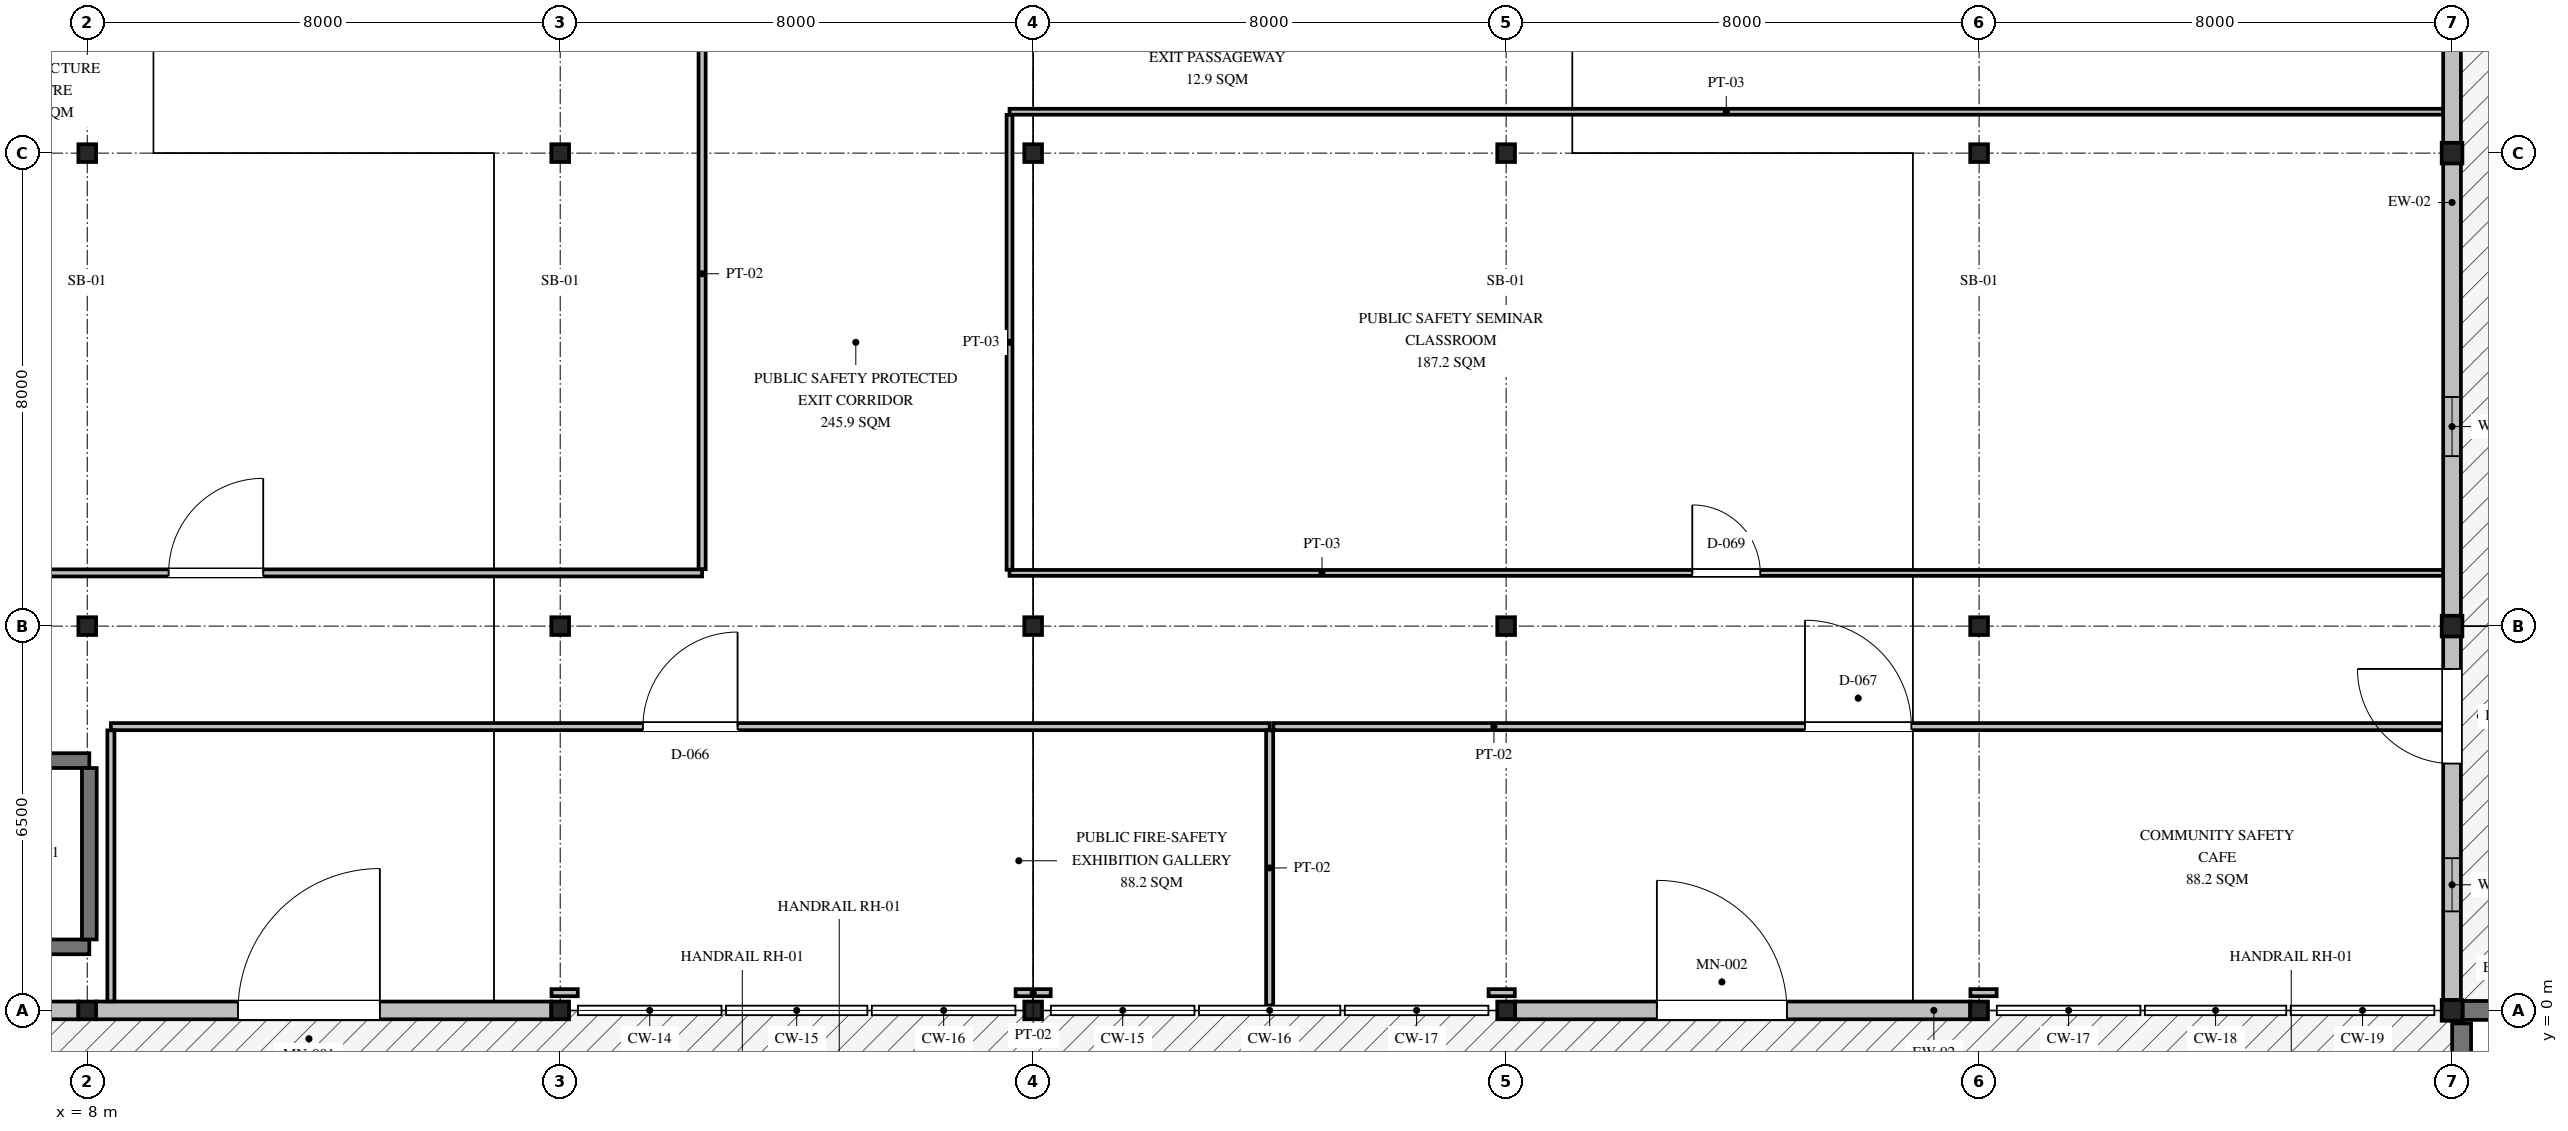
"""IFC4 building model, lengths in metres.
Left out: names, types, materials, properties, quantities, classifications, styles, units other than length and angle.
Written with IfcOpenShell. Run it as: python <this file> out.ifc"""

import sys

from ifc_helpers import new_model, si_unit, direction, frame, frame_2d, origin, origin_2d, place, context, subcontext, project, spatial, rectangle, i_section, extrude, element, fill, save


model = new_model("IFC4")
c1 = context("Model", 3, precision=1e-05, world=origin(), true_north=direction((0.0, 1.0)))
c2 = subcontext(c1, "Body", "Model", "MODEL_VIEW")
j1 = project(units=[si_unit("LENGTHUNIT", "METRE"), si_unit("PLANEANGLEUNIT", "RADIAN")], contexts=[c1])
p1 = place(None, origin())
s1 = spatial("IfcSite", under=j1, at=p1, CompositionType="ELEMENT")
p2 = place(p1, origin())
s2 = spatial("IfcBuilding", under=s1, at=p2, CompositionType="ELEMENT")
p3 = place(p2, frame((0.0, 0.0, 0.45)))
s3 = spatial("IfcBuildingStorey", under=s2, at=p3, CompositionType="ELEMENT", Elevation=0.45)
for number, where, z_axis, x_axis in (
    (1, (8.0, 0.0, -0.45), (0.0, 0.0, 1.0), (1.0, 0.0, 0.0)),
    (2, (8.0, 6.5, -0.45), (0.0, 0.0, 1.0), (1.0, 0.0, 0.0)),
    (3, (8.0, 14.5, -0.45), (0.0, 0.0, 1.0), (1.0, 0.0, 0.0)),
    (4, (16.0, 0.0, -0.45), (0.0, 0.0, 1.0), (1.0, 0.0, 0.0)),
    (5, (16.0, 6.5, -0.45), (0.0, 0.0, 1.0), (1.0, 0.0, 0.0)),
    (6, (16.0, 14.5, -0.45), (0.0, 0.0, 1.0), (1.0, 0.0, 0.0)),
    (7, (24.0, 0.0, -0.45), (0.0, 0.0, 1.0), (1.0, 0.0, 0.0)),
    (8, (24.0, 6.5, -0.45), (0.0, 0.0, 1.0), (1.0, 0.0, 0.0)),
    (9, (24.0, 14.5, -0.45), (0.0, 0.0, 1.0), (1.0, 0.0, 0.0)),
    (10, (32.0, 0.0, -0.45), (0.0, 0.0, 1.0), (1.0, 0.0, 0.0)),
    (11, (32.0, 6.5, -0.45), (0.0, 0.0, 1.0), (1.0, 0.0, 0.0)),
    (12, (32.0, 14.5, -0.45), (0.0, 0.0, 1.0), (1.0, 0.0, 0.0)),
    (13, (40.0, 0.0, -0.45), (0.0, 0.0, 1.0), (1.0, 0.0, 0.0)),
    (14, (40.0, 6.5, -0.45), (0.0, 0.0, 1.0), (1.0, 0.0, 0.0)),
    (15, (40.0, 14.5, -0.45), (0.0, 0.0, 1.0), (1.0, 0.0, 0.0)),
):
    element("IfcColumn", number, at=place(p3, frame(where, z_axis=z_axis, x_axis=x_axis)), inside=s3, PredefinedType="COLUMN", context=c2, shape_type="SweptSolid", body=[
        extrude(i_section(OverallWidth=0.3, OverallDepth=0.3, WebThickness=0.01, FlangeThickness=0.015, FilletRadius=0.018, at=origin_2d()), origin(), (0.0, 0.0, 1.0), 5.85),
    ])
for number, where, z_axis, x_axis in (
    (16, (48.0, 0.0, -0.45), (0.0, 0.0, 1.0), (1.0, 0.0, 0.0)),
    (17, (48.0, 6.5, -0.45), (0.0, 0.0, 1.0), (1.0, 0.0, 0.0)),
    (18, (48.0, 14.5, -0.45), (0.0, 0.0, 1.0), (1.0, 0.0, 0.0)),
):
    element("IfcColumn", number, at=place(p3, frame(where, z_axis=z_axis, x_axis=x_axis)), inside=s3, PredefinedType="COLUMN", context=c2, shape_type="SweptSolid", body=[
        extrude(i_section(OverallWidth=0.35, OverallDepth=0.35, WebThickness=0.012, FlangeThickness=0.019, FilletRadius=0.02, at=origin_2d()), origin(), (0.0, 0.0, 1.0), 5.85),
    ])
p4 = place(p3, frame((48.162, -2.722, -1.0), z_axis=(0.0, 0.0, 1.0), x_axis=(0.0, 1.0, 0.0)))
e19 = element("IfcWall", 19, at=p4, inside=s3, PredefinedType="SOLIDWALL", context=c2, shape_type="SweptSolid", body=[
    extrude(rectangle(XDim=2.502, YDim=0.32, at=frame_2d((1.251, 0.0))), origin(), (0.0, 0.0, 1.0), 1.0),
])
p5 = place(p3, frame((48.18, 0.0, -0.45), z_axis=(0.0, 0.0, 1.0), x_axis=(1.0, 0.0, 0.0)))
e20 = element("IfcWall", 20, at=p5, inside=s3, PredefinedType="SOLIDWALL", context=c2, shape_type="SweptSolid", body=[
    extrude(rectangle(XDim=1.416, YDim=0.32, at=frame_2d((0.708, 0.0))), origin(), (0.0, 0.0, 1.0), 0.45),
])
p6 = place(p3, frame((0.175, 0.0, 0.0), z_axis=(0.0, 0.0, 1.0), x_axis=(1.0, 0.0, 0.0)))
e21 = element("IfcWall", 21, at=p6, inside=s3, PredefinedType="SOLIDWALL", context=c2, shape_type="SweptSolid", body=[
    extrude(rectangle(XDim=7.675, YDim=0.3, at=frame_2d((3.837, 0.0))), origin(), (0.0, 0.0, 1.0), 4.694),
])
p7 = place(p6, frame((2.2, 0.0, 1.1)))
e22 = element("IfcOpeningElement", 22, at=p7, cuts=e21, PredefinedType="OPENING", context=c2, shape_type="SweptSolid", body=[
    extrude(rectangle(XDim=0.8, YDim=1.3, at=frame_2d((0.4, 0.65))), frame((0.0, 0.16, 0.0), z_axis=(0.0, -1.0, 0.0), x_axis=(1.0, 0.0, 0.0)), (0.0, 0.0, 1.0), 0.32),
])
p8 = place(p3, frame((8.15, 0.0, 0.0), z_axis=(0.0, 0.0, 1.0), x_axis=(1.0, 0.0, 0.0)))
e23 = element("IfcWall", 23, at=p8, inside=s3, PredefinedType="SOLIDWALL", context=c2, shape_type="SweptSolid", body=[
    extrude(rectangle(XDim=7.7, YDim=0.3, at=frame_2d((3.85, 0.0))), origin(), (0.0, 0.0, 1.0), 4.594),
])
p9 = place(p8, frame((2.4, 0.0, 0.0)))
e24 = element("IfcOpeningElement", 24, at=p9, cuts=e23, PredefinedType="OPENING", context=c2, shape_type="SweptSolid", body=[
    extrude(rectangle(XDim=2.4, YDim=2.7, at=frame_2d((1.2, 1.35))), frame((0.0, 0.16, 0.0), z_axis=(0.0, -1.0, 0.0), x_axis=(1.0, 0.0, 0.0)), (0.0, 0.0, 1.0), 0.32),
])
p10 = place(p3, frame((32.15, 0.0, 0.0), z_axis=(0.0, 0.0, 1.0), x_axis=(1.0, 0.0, 0.0)))
e25 = element("IfcWall", 25, at=p10, inside=s3, PredefinedType="SOLIDWALL", context=c2, shape_type="SweptSolid", body=[
    extrude(rectangle(XDim=7.7, YDim=0.3, at=frame_2d((3.85, 0.0))), origin(), (0.0, 0.0, 1.0), 4.794),
])
p11 = place(p10, frame((2.4, 0.0, 0.0)))
e26 = element("IfcOpeningElement", 26, at=p11, cuts=e25, PredefinedType="OPENING", context=c2, shape_type="SweptSolid", body=[
    extrude(rectangle(XDim=2.2, YDim=2.6, at=frame_2d((1.1, 1.3))), frame((0.0, 0.16, 0.0), z_axis=(0.0, -1.0, 0.0), x_axis=(1.0, 0.0, 0.0)), (0.0, 0.0, 1.0), 0.32),
])
p12 = place(p3, frame((48.0, 0.175, 0.0), z_axis=(0.0, 0.0, 1.0), x_axis=(0.0, 1.0, 0.0)))
e27 = element("IfcWall", 27, at=p12, inside=s3, PredefinedType="SOLIDWALL", context=c2, shape_type="SweptSolid", body=[
    extrude(rectangle(XDim=22.15, YDim=0.3, at=frame_2d((11.075, 0.0))), origin(), (0.0, 0.0, 1.0), 4.494),
])
p13 = place(p12, frame((4.0, 0.0, 0.0)))
e28 = element("IfcOpeningElement", 28, at=p13, cuts=e27, PredefinedType="OPENING", context=c2, shape_type="SweptSolid", body=[
    extrude(rectangle(XDim=1.6, YDim=2.4, at=frame_2d((0.8, 1.2))), frame((0.0, 0.16, 0.0), z_axis=(0.0, -1.0, 0.0), x_axis=(1.0, 0.0, 0.0)), (0.0, 0.0, 1.0), 0.32),
])
p14 = place(p12, frame((1.5, 0.0, 1.0)))
e29 = element("IfcOpeningElement", 29, at=p14, cuts=e27, PredefinedType="OPENING", context=c2, shape_type="SweptSolid", body=[
    extrude(rectangle(XDim=0.9, YDim=1.4, at=frame_2d((0.45, 0.7))), frame((0.0, 0.16, 0.0), z_axis=(0.0, -1.0, 0.0), x_axis=(1.0, 0.0, 0.0)), (0.0, 0.0, 1.0), 0.32),
])
p15 = place(p12, frame((9.2, 0.0, 1.0)))
e30 = element("IfcOpeningElement", 30, at=p15, cuts=e27, PredefinedType="OPENING", context=c2, shape_type="SweptSolid", body=[
    extrude(rectangle(XDim=1.0, YDim=1.5, at=frame_2d((0.5, 0.75))), frame((0.0, 0.16, 0.0), z_axis=(0.0, -1.0, 0.0), x_axis=(1.0, 0.0, 0.0)), (0.0, 0.0, 1.0), 0.32),
])
p16 = place(p12, frame((16.2, 0.0, 1.0)))
e31 = element("IfcOpeningElement", 31, at=p16, cuts=e27, PredefinedType="OPENING", context=c2, shape_type="SweptSolid", body=[
    extrude(rectangle(XDim=1.1, YDim=1.5, at=frame_2d((0.55, 0.75))), frame((0.0, 0.16, 0.0), z_axis=(0.0, -1.0, 0.0), x_axis=(1.0, 0.0, 0.0)), (0.0, 0.0, 1.0), 0.32),
])
p17 = place(p3, frame((0.225, 1.075, 0.0), z_axis=(0.0, 0.0, 1.0), x_axis=(1.0, 0.0, 0.0)))
e32 = element("IfcWall", 32, at=p17, inside=s3, PredefinedType="SHEAR", context=c2, shape_type="SweptSolid", body=[
    extrude(rectangle(XDim=7.81, YDim=0.25, at=frame_2d((3.905, 0.0))), origin(), (0.0, 0.0, 1.0), 5.2),
])
p18 = place(p3, frame((0.225, 4.225, 0.0), z_axis=(0.0, 0.0, 1.0), x_axis=(1.0, 0.0, 0.0)))
e33 = element("IfcWall", 33, at=p18, inside=s3, PredefinedType="SHEAR", context=c2, shape_type="SweptSolid", body=[
    extrude(rectangle(XDim=7.81, YDim=0.25, at=frame_2d((3.905, 0.0))), origin(), (0.0, 0.0, 1.0), 5.2),
])
p19 = place(p18, frame((0.22, 0.0, 0.0)))
e34 = element("IfcOpeningElement", 34, at=p19, cuts=e33, PredefinedType="OPENING", context=c2, shape_type="SweptSolid", body=[
    extrude(rectangle(XDim=1.1, YDim=2.15, at=frame_2d((0.55, 1.075))), frame((0.0, 0.135, 0.0), z_axis=(0.0, -1.0, 0.0), x_axis=(1.0, 0.0, 0.0)), (0.0, 0.0, 1.0), 0.27),
])
p20 = place(p3, frame((8.035, 1.2, 0.0), z_axis=(0.0, 0.0, 1.0), x_axis=(0.0, 1.0, 0.0)))
e35 = element("IfcWall", 35, at=p20, inside=s3, PredefinedType="SHEAR", context=c2, shape_type="SweptSolid", body=[
    extrude(rectangle(XDim=2.9, YDim=0.25, at=frame_2d((1.45, 0.0))), origin(), (0.0, 0.0, 1.0), 5.2),
])
p21 = place(p3, frame((15.853, 0.3, 0.0), z_axis=(0.0, 0.0, 1.0), x_axis=(1.0, 0.0, 0.0)))
e36 = element("IfcWall", 36, at=p21, inside=s3, PredefinedType="PARTITIONING", context=c2, shape_type="SweptSolid", body=[
    extrude(rectangle(XDim=0.444, YDim=0.12, at=frame_2d((0.222, 0.0))), origin(), (0.0, 0.0, 1.0), 5.2),
])
p22 = place(p3, frame((23.703, 0.3, 0.0), z_axis=(0.0, 0.0, 1.0), x_axis=(1.0, 0.0, 0.0)))
e37 = element("IfcWall", 37, at=p22, inside=s3, PredefinedType="PARTITIONING", context=c2, shape_type="SweptSolid", body=[
    extrude(rectangle(XDim=0.594, YDim=0.12, at=frame_2d((0.297, 0.0))), origin(), (0.0, 0.0, 1.0), 5.2),
])
p23 = place(p3, frame((8.4, 4.8, 0.0), z_axis=(0.0, 0.0, 1.0), x_axis=(1.0, 0.0, 0.0)))
e38 = element("IfcWall", 38, at=p23, inside=s3, PredefinedType="PARTITIONING", context=c2, shape_type="SweptSolid", body=[
    extrude(rectangle(XDim=19.6, YDim=0.12, at=frame_2d((9.8, 0.0))), origin(), (0.0, 0.0, 1.0), 5.2),
])
p24 = place(p23, frame((9.0, 0.0, 0.0)))
e39 = element("IfcOpeningElement", 39, at=p24, cuts=e38, PredefinedType="OPENING", context=c2, shape_type="SweptSolid", body=[
    extrude(rectangle(XDim=1.6, YDim=2.2, at=frame_2d((0.8, 1.1))), frame((0.0, 0.07, 0.0), z_axis=(0.0, -1.0, 0.0), x_axis=(1.0, 0.0, 0.0)), (0.0, 0.0, 1.0), 0.14),
])
p25 = place(p3, frame((8.4, 0.153, 0.0), z_axis=(0.0, 0.0, 1.0), x_axis=(0.0, 1.0, 0.0)))
e40 = element("IfcWall", 40, at=p25, inside=s3, PredefinedType="PARTITIONING", context=c2, shape_type="SweptSolid", body=[
    extrude(rectangle(XDim=4.584, YDim=0.12, at=frame_2d((2.292, 0.0))), origin(), (0.0, 0.0, 1.0), 5.2),
])
p26 = place(p3, frame((28.0, 0.083, 0.0), z_axis=(0.0, 0.0, 1.0), x_axis=(0.0, 1.0, 0.0)))
e41 = element("IfcWall", 41, at=p26, inside=s3, PredefinedType="PARTITIONING", context=c2, shape_type="SweptSolid", body=[
    extrude(rectangle(XDim=4.654, YDim=0.12, at=frame_2d((2.327, 0.0))), origin(), (0.0, 0.0, 1.0), 4.994),
])
for number, where, z_axis, x_axis in (
    (42, (31.703, 0.3, 0.0), (0.0, 0.0, 1.0), (1.0, 0.0, 0.0)),
    (43, (39.853, 0.3, 0.0), (0.0, 0.0, 1.0), (1.0, 0.0, 0.0)),
):
    element("IfcWall", number, at=place(p3, frame(where, z_axis=z_axis, x_axis=x_axis)), inside=s3, PredefinedType="PARTITIONING", context=c2, shape_type="SweptSolid", body=[
        extrude(rectangle(XDim=0.444, YDim=0.12, at=frame_2d((0.222, 0.0))), origin(), (0.0, 0.0, 1.0), 5.2),
    ])
p27 = place(p3, frame((28.063, 4.8, 0.0), z_axis=(0.0, 0.0, 1.0), x_axis=(1.0, 0.0, 0.0)))
e44 = element("IfcWall", 44, at=p27, inside=s3, PredefinedType="PARTITIONING", context=c2, shape_type="SweptSolid", body=[
    extrude(rectangle(XDim=19.784, YDim=0.12, at=frame_2d((9.892, 0.0))), origin(), (0.0, 0.0, 1.0), 5.2),
])
p28 = place(p27, frame((8.992, 0.0, 0.0)))
e45 = element("IfcOpeningElement", 45, at=p28, cuts=e44, PredefinedType="OPENING", context=c2, shape_type="SweptSolid", body=[
    extrude(rectangle(XDim=1.8, YDim=2.3, at=frame_2d((0.9, 1.15))), frame((0.0, 0.07, 0.0), z_axis=(0.0, -1.0, 0.0), x_axis=(1.0, 0.0, 0.0)), (0.0, 0.0, 1.0), 0.14),
])
p29 = place(p3, frame((0.153, 7.4, 0.0), z_axis=(0.0, 0.0, 1.0), x_axis=(1.0, 0.0, 0.0)))
e46 = element("IfcWall", 46, at=p29, inside=s3, PredefinedType="PARTITIONING", context=c2, shape_type="SweptSolid", body=[
    extrude(rectangle(XDim=18.247, YDim=0.12, at=frame_2d((9.124, 0.0))), origin(), (0.0, 0.0, 1.0), 5.2),
])
p30 = place(p29, frame((9.223, 0.0, 0.0)))
e47 = element("IfcOpeningElement", 47, at=p30, cuts=e46, PredefinedType="OPENING", context=c2, shape_type="SweptSolid", body=[
    extrude(rectangle(XDim=1.6, YDim=2.2, at=frame_2d((0.8, 1.1))), frame((0.0, 0.07, 0.0), z_axis=(0.0, -1.0, 0.0), x_axis=(1.0, 0.0, 0.0)), (0.0, 0.0, 1.0), 0.14),
])
p31 = place(p3, frame((18.4, 7.463, 0.0), z_axis=(0.0, 0.0, 1.0), x_axis=(0.0, 1.0, 0.0)))
e48 = element("IfcWall", 48, at=p31, inside=s3, PredefinedType="PARTITIONING", context=c2, shape_type="SweptSolid", body=[
    extrude(rectangle(XDim=10.859, YDim=0.12, at=frame_2d((5.43, 0.0))), origin(), (0.0, 0.0, 1.0), 5.2),
])
p32 = place(p3, frame((23.6, 7.4, 0.0), z_axis=(0.0, 0.0, 1.0), x_axis=(1.0, 0.0, 0.0)))
e49 = element("IfcWall", 49, at=p32, inside=s3, PredefinedType="PARTITIONING", context=c2, shape_type="SweptSolid", body=[
    extrude(rectangle(XDim=24.247, YDim=0.1, at=frame_2d((12.124, 0.0))), origin(), (0.0, 0.0, 1.0), 5.2),
])
p33 = place(p32, frame((11.549, 0.0, 0.0)))
e50 = element("IfcOpeningElement", 50, at=p33, cuts=e49, PredefinedType="OPENING", context=c2, shape_type="SweptSolid", body=[
    extrude(rectangle(XDim=1.15, YDim=2.1, at=frame_2d((0.575, 1.05))), frame((0.0, 0.06, 0.0), z_axis=(0.0, -1.0, 0.0), x_axis=(1.0, 0.0, 0.0)), (0.0, 0.0, 1.0), 0.12),
])
p34 = place(p3, frame((23.6, 15.2, 0.0), z_axis=(0.0, 0.0, 1.0), x_axis=(1.0, 0.0, 0.0)))
e51 = element("IfcWall", 51, at=p34, inside=s3, PredefinedType="PARTITIONING", context=c2, shape_type="SweptSolid", body=[
    extrude(rectangle(XDim=24.247, YDim=0.1, at=frame_2d((12.124, 0.0))), origin(), (0.0, 0.0, 1.0), 5.2),
])
p35 = place(p3, frame((23.6, 7.453, 0.0), z_axis=(0.0, 0.0, 1.0), x_axis=(0.0, 1.0, 0.0)))
e52 = element("IfcWall", 52, at=p35, inside=s3, PredefinedType="PARTITIONING", context=c2, shape_type="SweptSolid", body=[
    extrude(rectangle(XDim=7.694, YDim=0.1, at=frame_2d((3.847, 0.0))), origin(), (0.0, 0.0, 1.0), 5.2),
])
p36 = place(p9, frame((2.4, 0.0, 0.0), z_axis=(0.0, 0.0, 1.0), x_axis=(-1.0, 0.0, 0.0)))
e53 = element("IfcDoor", 53, at=p36, inside=s3, OperationType="SINGLE_SWING_RIGHT", PredefinedType="DOOR", context=c2, shape_type="SweptSolid", body=[
    extrude(rectangle(XDim=2.4, YDim=2.7, at=frame_2d((1.2, 1.35))), frame((0.0, 0.025, 0.0), z_axis=(0.0, -1.0, 0.0), x_axis=(1.0, 0.0, 0.0)), (0.0, 0.0, 1.0), 0.05),
])
fill(e24, e53)
p37 = place(p11, frame((2.2, 0.0, 0.0), z_axis=(0.0, 0.0, 1.0), x_axis=(-1.0, 0.0, 0.0)))
e54 = element("IfcDoor", 54, at=p37, inside=s3, OperationType="SINGLE_SWING_LEFT", PredefinedType="DOOR", context=c2, shape_type="SweptSolid", body=[
    extrude(rectangle(XDim=2.2, YDim=2.6, at=frame_2d((1.1, 1.3))), frame((0.0, 0.025, 0.0), z_axis=(0.0, -1.0, 0.0), x_axis=(1.0, 0.0, 0.0)), (0.0, 0.0, 1.0), 0.05),
])
fill(e26, e54)
p38 = place(p13, frame((1.6, 0.0, 0.0), z_axis=(0.0, 0.0, 1.0), x_axis=(-1.0, 0.0, 0.0)))
e55 = element("IfcDoor", 55, at=p38, inside=s3, OperationType="SINGLE_SWING_RIGHT", PredefinedType="DOOR", context=c2, shape_type="SweptSolid", body=[
    extrude(rectangle(XDim=1.6, YDim=2.4, at=frame_2d((0.8, 1.2))), frame((0.0, 0.025, 0.0), z_axis=(0.0, -1.0, 0.0), x_axis=(1.0, 0.0, 0.0)), (0.0, 0.0, 1.0), 0.05),
])
fill(e28, e55)
p39 = place(p14, origin())
e56 = element("IfcWindow", 56, at=p39, inside=s3, PartitioningType="SINGLE_PANEL", PredefinedType="WINDOW", context=c2, shape_type="SweptSolid", body=[
    extrude(rectangle(XDim=0.9, YDim=1.4, at=frame_2d((0.45, 0.7))), frame((0.0, 0.03, 0.0), z_axis=(0.0, -1.0, 0.0), x_axis=(1.0, 0.0, 0.0)), (0.0, 0.0, 1.0), 0.06),
])
fill(e29, e56)
p40 = place(p15, origin())
e57 = element("IfcWindow", 57, at=p40, inside=s3, PartitioningType="SINGLE_PANEL", PredefinedType="WINDOW", context=c2, shape_type="SweptSolid", body=[
    extrude(rectangle(XDim=1.0, YDim=1.5, at=frame_2d((0.5, 0.75))), frame((0.0, 0.03, 0.0), z_axis=(0.0, -1.0, 0.0), x_axis=(1.0, 0.0, 0.0)), (0.0, 0.0, 1.0), 0.06),
])
fill(e30, e57)
p41 = place(p24, origin())
e58 = element("IfcDoor", 58, at=p41, inside=s3, OperationType="SINGLE_SWING_RIGHT", PredefinedType="DOOR", context=c2, shape_type="SweptSolid", body=[
    extrude(rectangle(XDim=1.6, YDim=2.2, at=frame_2d((0.8, 1.1))), frame((0.0, 0.025, 0.0), z_axis=(0.0, -1.0, 0.0), x_axis=(1.0, 0.0, 0.0)), (0.0, 0.0, 1.0), 0.05),
])
fill(e39, e58)
p42 = place(p28, origin())
e59 = element("IfcDoor", 59, at=p42, inside=s3, OperationType="SINGLE_SWING_LEFT", PredefinedType="DOOR", context=c2, shape_type="SweptSolid", body=[
    extrude(rectangle(XDim=1.8, YDim=2.3, at=frame_2d((0.9, 1.15))), frame((0.0, 0.025, 0.0), z_axis=(0.0, -1.0, 0.0), x_axis=(1.0, 0.0, 0.0)), (0.0, 0.0, 1.0), 0.05),
])
fill(e45, e59)
p43 = place(p30, origin())
e60 = element("IfcDoor", 60, at=p43, inside=s3, OperationType="SINGLE_SWING_RIGHT", PredefinedType="DOOR", context=c2, shape_type="SweptSolid", body=[
    extrude(rectangle(XDim=1.6, YDim=2.2, at=frame_2d((0.8, 1.1))), frame((0.0, 0.025, 0.0), z_axis=(0.0, -1.0, 0.0), x_axis=(1.0, 0.0, 0.0)), (0.0, 0.0, 1.0), 0.05),
])
fill(e47, e60)
p44 = place(p33, origin())
e61 = element("IfcDoor", 61, at=p44, inside=s3, OperationType="SINGLE_SWING_LEFT", PredefinedType="DOOR", context=c2, shape_type="SweptSolid", body=[
    extrude(rectangle(XDim=1.15, YDim=2.1, at=frame_2d((0.575, 1.05))), frame((0.0, 0.025, 0.0), z_axis=(0.0, -1.0, 0.0), x_axis=(1.0, 0.0, 0.0)), (0.0, 0.0, 1.0), 0.05),
])
fill(e50, e61)
save(model, sys.argv[1])
